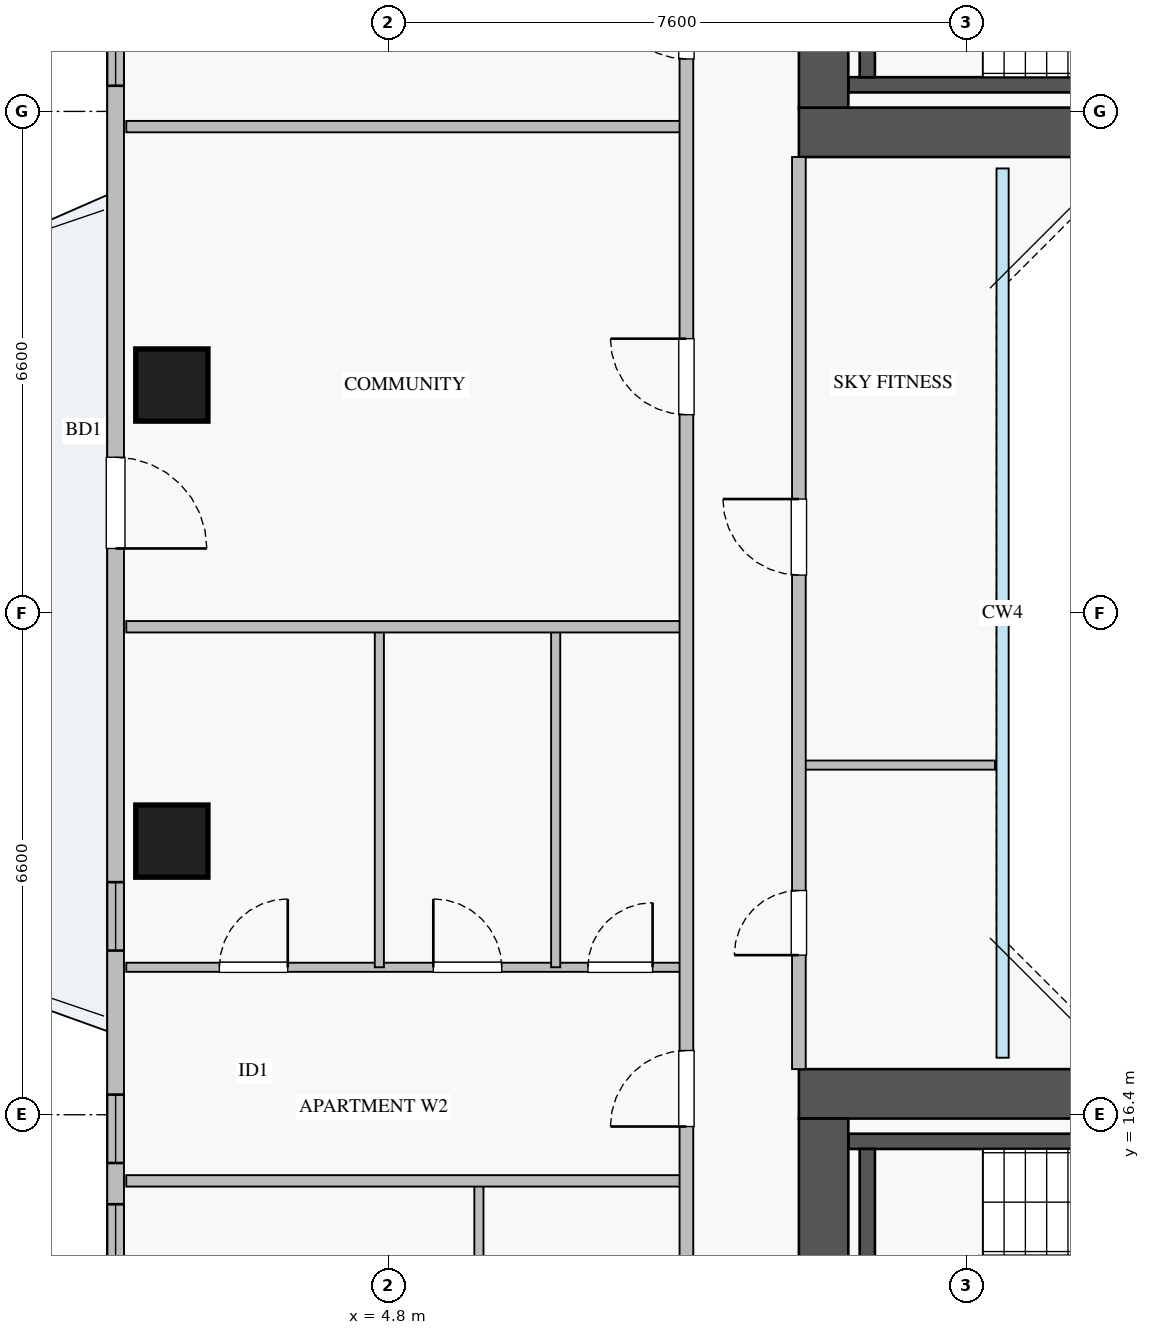
"""IFC4 building model, lengths in metres.
Left out: names, types, materials, properties, quantities, classifications, styles, units other than length and angle.
Written with IfcOpenShell. Run it as: python <this file> out.ifc"""

import sys

from ifc_helpers import new_model, si_unit, direction, frame, frame_2d, origin, origin_2d, place, context, subcontext, project, spatial, rectangle, extrude, source, transform, mapped, element, fill, save


model = new_model("IFC4")
c1 = context("Model", 3, precision=1e-05, world=origin(), true_north=direction((0.0, 1.0)))
c2 = subcontext(c1, "Body", "Model", "MODEL_VIEW")
j1 = project(units=[si_unit("LENGTHUNIT", "METRE"), si_unit("PLANEANGLEUNIT", "RADIAN")], contexts=[c1])
p1 = place(None, origin())
s1 = spatial("IfcSite", under=j1, at=p1, CompositionType="ELEMENT")
p2 = place(p1, origin())
s2 = spatial("IfcBuilding", under=s1, at=p2, CompositionType="ELEMENT")
p3 = place(p2, frame((0.0, 0.0, 182.75)))
s3 = spatial("IfcBuildingStorey", under=s2, at=p3, CompositionType="ELEMENT", Elevation=182.75)
p4 = place(p3, frame((10.85, 29.95, 0.0), z_axis=(0.0, 0.0, 1.0), x_axis=(1.0, 0.0, 0.0)))
e1 = element("IfcWall", 1, at=p4, inside=s3, PredefinedType="SHEAR", context=c2, shape_type="SweptSolid", body=[
    extrude(rectangle(XDim=7.3, YDim=0.2, at=frame_2d((3.65, 0.0))), origin(), (0.0, 0.0, 1.0), 3.25),
])
p5 = place(p3, frame((11.1, 30.05, 0.0), z_axis=(0.0, 0.0, 1.0), x_axis=(0.0, 1.0, 0.0)))
e2 = element("IfcWall", 2, at=p5, inside=s3, PredefinedType="SHEAR", context=c2, shape_type="SweptSolid", body=[
    extrude(rectangle(XDim=2.94, YDim=0.2, at=frame_2d((1.47, 0.0))), origin(), (0.0, 0.0, 1.0), 3.25),
])
p6 = place(p3, frame((10.85, 16.05, 0.0), z_axis=(0.0, 0.0, 1.0), x_axis=(1.0, 0.0, 0.0)))
e3 = element("IfcWall", 3, at=p6, inside=s3, PredefinedType="SHEAR", context=c2, shape_type="SweptSolid", body=[
    extrude(rectangle(XDim=7.3, YDim=0.2, at=frame_2d((3.65, 0.0))), origin(), (0.0, 0.0, 1.0), 3.25),
])
p7 = place(p3, frame((11.1, 13.01, 0.0), z_axis=(0.0, 0.0, 1.0), x_axis=(0.0, 1.0, 0.0)))
e4 = element("IfcWall", 4, at=p7, inside=s3, PredefinedType="SHEAR", context=c2, shape_type="SweptSolid", body=[
    extrude(rectangle(XDim=2.94, YDim=0.2, at=frame_2d((1.47, 0.0))), origin(), (0.0, 0.0, 1.0), 3.25),
])
p8 = place(p3, frame((10.2, 29.325, 0.0), z_axis=(0.0, 0.0, 1.0), x_axis=(1.0, 0.0, 0.0)))
e5 = element("IfcWall", 5, at=p8, inside=s3, PredefinedType="SHEAR", context=c2, shape_type="SweptSolid", body=[
    extrude(rectangle(XDim=17.6, YDim=0.65, at=frame_2d((8.8, 0.0))), origin(), (0.0, 0.0, 1.0), 3.25),
])
p9 = place(p3, frame((10.525, 29.65, 0.0), z_axis=(0.0, 0.0, 1.0), x_axis=(0.0, 1.0, 0.0)))
e6 = element("IfcWall", 6, at=p9, inside=s3, PredefinedType="SHEAR", context=c2, shape_type="SweptSolid", body=[
    extrude(rectangle(XDim=5.9, YDim=0.65, at=frame_2d((2.95, 0.0))), origin(), (0.0, 0.0, 1.0), 3.25),
])
p10 = place(p3, frame((10.2, 16.675, 0.0), z_axis=(0.0, 0.0, 1.0), x_axis=(1.0, 0.0, 0.0)))
e7 = element("IfcWall", 7, at=p10, inside=s3, PredefinedType="SHEAR", context=c2, shape_type="SweptSolid", body=[
    extrude(rectangle(XDim=17.6, YDim=0.65, at=frame_2d((8.8, 0.0))), origin(), (0.0, 0.0, 1.0), 3.25),
])
p11 = place(p3, frame((10.525, 10.45, 0.0), z_axis=(0.0, 0.0, 1.0), x_axis=(0.0, 1.0, 0.0)))
e8 = element("IfcWall", 8, at=p11, inside=s3, PredefinedType="SHEAR", context=c2, shape_type="SweptSolid", body=[
    extrude(rectangle(XDim=5.9, YDim=0.65, at=frame_2d((2.95, 0.0))), origin(), (0.0, 0.0, 1.0), 3.25),
])
m1 = source(origin(), c2, "Body", "SweptSolid", [
    extrude(rectangle(XDim=0.95, YDim=0.95, at=origin_2d()), origin(), (0.0, 0.0, 1.0), 3.25),
])
for number, where, z_axis, x_axis in (
    (9, (1.95, 26.0, 0.0), (0.0, 0.0, 1.0), (1.0, 0.0, 0.0)),
    (10, (1.95, 20.0, 0.0), (0.0, 0.0, 1.0), (1.0, 0.0, 0.0)),
):
    element("IfcColumn", number, at=place(p3, frame(where, z_axis=z_axis, x_axis=x_axis)), inside=s3, PredefinedType="COLUMN", context=c2, shape_type="MappedRepresentation", body=[
        mapped(m1, transform((0.0, 0.0, 0.0), x_axis=(1.0, 0.0, 0.0), y_axis=(0.0, 1.0, 0.0), z_axis=(0.0, 0.0, 1.0), scale=1.0)),
    ])
p12 = place(p3, frame((1.21, 10.55, 0.0), z_axis=(0.0, 0.0, 1.0), x_axis=(0.0, 1.0, 0.0)))
e11 = element("IfcWall", 11, at=p12, inside=s3, PredefinedType="STANDARD", context=c2, shape_type="SweptSolid", body=[
    extrude(rectangle(XDim=24.9, YDim=0.22, at=frame_2d((12.45, 0.0))), origin(), (0.0, 0.0, 1.0), 2.57),
])
p13 = place(p12, frame((13.3, 0.0, 0.0)))
e12 = element("IfcOpeningElement", 12, at=p13, cuts=e11, PredefinedType="OPENING", context=c2, shape_type="SweptSolid", body=[
    extrude(rectangle(XDim=1.2, YDim=2.1, at=frame_2d((0.6, 1.05))), frame((0.0, 0.12, 0.0), z_axis=(0.0, -1.0, 0.0), x_axis=(1.0, 0.0, 0.0)), (0.0, 0.0, 1.0), 0.24),
])
p14 = place(p12, frame((2.573, 0.0, 0.9)))
e13 = element("IfcOpeningElement", 13, at=p14, cuts=e11, PredefinedType="OPENING", context=c2, shape_type="SweptSolid", body=[
    extrude(rectangle(XDim=2.1, YDim=1.5, at=frame_2d((1.05, 0.75))), frame((0.0, 0.12, 0.0), z_axis=(0.0, -1.0, 0.0), x_axis=(1.0, 0.0, 0.0)), (0.0, 0.0, 1.0), 0.24),
])
p15 = place(p12, frame((19.387, 0.0, 0.9)))
e14 = element("IfcOpeningElement", 14, at=p15, cuts=e11, PredefinedType="OPENING", context=c2, shape_type="SweptSolid", body=[
    extrude(rectangle(XDim=2.1, YDim=1.5, at=frame_2d((1.05, 0.75))), frame((0.0, 0.12, 0.0), z_axis=(0.0, -1.0, 0.0), x_axis=(1.0, 0.0, 0.0)), (0.0, 0.0, 1.0), 0.24),
])
p16 = place(p12, frame((22.24, 0.0, 0.9)))
e15 = element("IfcOpeningElement", 15, at=p16, cuts=e11, PredefinedType="OPENING", context=c2, shape_type="SweptSolid", body=[
    extrude(rectangle(XDim=2.4, YDim=1.5, at=frame_2d((1.2, 0.75))), frame((0.0, 0.12, 0.0), z_axis=(0.0, -1.0, 0.0), x_axis=(1.0, 0.0, 0.0)), (0.0, 0.0, 1.0), 0.24),
])
p17 = place(p12, frame((0.25, 0.0, 0.9)))
e16 = element("IfcOpeningElement", 16, at=p17, cuts=e11, PredefinedType="OPENING", context=c2, shape_type="SweptSolid", body=[
    extrude(rectangle(XDim=0.9, YDim=1.2, at=frame_2d((0.45, 0.6))), frame((0.0, 0.12, 0.0), z_axis=(0.0, -1.0, 0.0), x_axis=(1.0, 0.0, 0.0)), (0.0, 0.0, 1.0), 0.24),
])
p18 = place(p12, frame((8.01, 0.0, 0.9)))
e17 = element("IfcOpeningElement", 17, at=p18, cuts=e11, PredefinedType="OPENING", context=c2, shape_type="SweptSolid", body=[
    extrude(rectangle(XDim=0.9, YDim=1.2, at=frame_2d((0.45, 0.6))), frame((0.0, 0.12, 0.0), z_axis=(0.0, -1.0, 0.0), x_axis=(1.0, 0.0, 0.0)), (0.0, 0.0, 1.0), 0.24),
])
p19 = place(p12, frame((5.215, 0.0, 0.9)))
e18 = element("IfcOpeningElement", 18, at=p19, cuts=e11, PredefinedType="OPENING", context=c2, shape_type="SweptSolid", body=[
    extrude(rectangle(XDim=0.9, YDim=1.2, at=frame_2d((0.45, 0.6))), frame((0.0, 0.12, 0.0), z_axis=(0.0, -1.0, 0.0), x_axis=(1.0, 0.0, 0.0)), (0.0, 0.0, 1.0), 0.24),
])
p20 = place(p3, frame((5.99, 12.83, 0.0), z_axis=(0.0, 0.0, 1.0), x_axis=(0.0, 1.0, 0.0)))
e19 = element("IfcWall", 19, at=p20, inside=s3, PredefinedType="PLUMBINGWALL", context=c2, shape_type="SweptSolid", body=[
    extrude(rectangle(XDim=2.7, YDim=0.12, at=frame_2d((1.35, 0.0))), origin(), (0.0, 0.0, 1.0), 2.825),
])
p21 = place(p3, frame((1.35, 18.34, 0.0), z_axis=(0.0, 0.0, 1.0), x_axis=(1.0, 0.0, 0.0)))
e20 = element("IfcWall", 20, at=p21, inside=s3, PredefinedType="PLUMBINGWALL", context=c2, shape_type="SweptSolid", body=[
    extrude(rectangle(XDim=7.37, YDim=0.12, at=frame_2d((3.685, 0.0))), origin(), (0.0, 0.0, 1.0), 2.731),
])
p22 = place(p21, frame((1.225, 0.0, 0.0)))
e21 = element("IfcOpeningElement", 21, at=p22, cuts=e20, PredefinedType="OPENING", context=c2, shape_type="SweptSolid", body=[
    extrude(rectangle(XDim=0.9, YDim=2.05, at=frame_2d((0.45, 1.025))), frame((0.0, 0.07, 0.0), z_axis=(0.0, -1.0, 0.0), x_axis=(1.0, 0.0, 0.0)), (0.0, 0.0, 1.0), 0.14),
])
p23 = place(p21, frame((4.04, 0.0, 0.0)))
e22 = element("IfcOpeningElement", 22, at=p23, cuts=e20, PredefinedType="OPENING", context=c2, shape_type="SweptSolid", body=[
    extrude(rectangle(XDim=0.9, YDim=2.05, at=frame_2d((0.45, 1.025))), frame((0.0, 0.07, 0.0), z_axis=(0.0, -1.0, 0.0), x_axis=(1.0, 0.0, 0.0)), (0.0, 0.0, 1.0), 0.14),
])
p24 = place(p21, frame((6.075, 0.0, 0.0)))
e23 = element("IfcOpeningElement", 23, at=p24, cuts=e20, PredefinedType="OPENING", context=c2, shape_type="SweptSolid", body=[
    extrude(rectangle(XDim=0.85, YDim=2.05, at=frame_2d((0.425, 1.025))), frame((0.0, 0.07, 0.0), z_axis=(0.0, -1.0, 0.0), x_axis=(1.0, 0.0, 0.0)), (0.0, 0.0, 1.0), 0.14),
])
for number, where, z_axis, x_axis in (
    (24, (4.68, 18.34, 0.0), (0.0, 0.0, 1.0), (0.0, 1.0, 0.0)),
    (25, (7.0, 18.34, 0.0), (0.0, 0.0, 1.0), (0.0, 1.0, 0.0)),
):
    element("IfcWall", number, at=place(p3, frame(where, z_axis=z_axis, x_axis=x_axis)), inside=s3, PredefinedType="PLUMBINGWALL", context=c2, shape_type="SweptSolid", body=[
        extrude(rectangle(XDim=4.48, YDim=0.12, at=frame_2d((2.24, 0.0))), origin(), (0.0, 0.0, 1.0), 3.03),
    ])
for number, where, z_axis, x_axis in (
    (26, (1.35, 15.53, 0.0), (0.0, 0.0, 1.0), (1.0, 0.0, 0.0)),
    (27, (1.35, 22.82, 0.0), (0.0, 0.0, 1.0), (1.0, 0.0, 0.0)),
    (28, (1.35, 29.4, 0.0), (0.0, 0.0, 1.0), (1.0, 0.0, 0.0)),
):
    element("IfcWall", number, at=place(p3, frame(where, z_axis=z_axis, x_axis=x_axis)), inside=s3, PredefinedType="PARTITIONING", context=c2, shape_type="SweptSolid", body=[
        extrude(rectangle(XDim=7.37, YDim=0.15, at=frame_2d((3.685, 0.0))), origin(), (0.0, 0.0, 1.0), 3.03),
    ])
p25 = place(p3, frame((8.72, 8.31, 0.0), z_axis=(0.0, 0.0, 1.0), x_axis=(0.0, 1.0, 0.0)))
e29 = element("IfcWall", 29, at=p25, inside=s3, PredefinedType="PARTITIONING", context=c2, shape_type="SweptSolid", body=[
    extrude(rectangle(XDim=29.37, YDim=0.18, at=frame_2d((14.685, 0.0))), origin(), (0.0, 0.0, 1.0), 3.03),
])
p26 = place(p25, frame((28.06, 0.0, 0.0)))
e30 = element("IfcOpeningElement", 30, at=p26, cuts=e29, PredefinedType="OPENING", context=c2, shape_type="SweptSolid", body=[
    extrude(rectangle(XDim=0.9, YDim=2.05, at=frame_2d((0.45, 1.025))), frame((0.0, 0.1, 0.0), z_axis=(0.0, -1.0, 0.0), x_axis=(1.0, 0.0, 0.0)), (0.0, 0.0, 1.0), 0.2),
])
p27 = place(p25, frame((0.24, 0.0, 0.0)))
e31 = element("IfcOpeningElement", 31, at=p27, cuts=e29, PredefinedType="OPENING", context=c2, shape_type="SweptSolid", body=[
    extrude(rectangle(XDim=0.9, YDim=2.05, at=frame_2d((0.45, 1.025))), frame((0.0, 0.1, 0.0), z_axis=(0.0, -1.0, 0.0), x_axis=(1.0, 0.0, 0.0)), (0.0, 0.0, 1.0), 0.2),
])
p28 = place(p25, frame((2.25, 0.0, 0.0)))
e32 = element("IfcOpeningElement", 32, at=p28, cuts=e29, PredefinedType="OPENING", context=c2, shape_type="SweptSolid", body=[
    extrude(rectangle(XDim=1.0, YDim=2.05, at=frame_2d((0.5, 1.025))), frame((0.0, 0.1, 0.0), z_axis=(0.0, -1.0, 0.0), x_axis=(1.0, 0.0, 0.0)), (0.0, 0.0, 1.0), 0.2),
])
p29 = place(p25, frame((7.935, 0.0, 0.0)))
e33 = element("IfcOpeningElement", 33, at=p29, cuts=e29, PredefinedType="OPENING", context=c2, shape_type="SweptSolid", body=[
    extrude(rectangle(XDim=1.0, YDim=2.05, at=frame_2d((0.5, 1.025))), frame((0.0, 0.1, 0.0), z_axis=(0.0, -1.0, 0.0), x_axis=(1.0, 0.0, 0.0)), (0.0, 0.0, 1.0), 0.2),
])
p30 = place(p25, frame((17.3, 0.0, 0.0)))
e34 = element("IfcOpeningElement", 34, at=p30, cuts=e29, PredefinedType="OPENING", context=c2, shape_type="SweptSolid", body=[
    extrude(rectangle(XDim=1.0, YDim=2.05, at=frame_2d((0.5, 1.025))), frame((0.0, 0.1, 0.0), z_axis=(0.0, -1.0, 0.0), x_axis=(1.0, 0.0, 0.0)), (0.0, 0.0, 1.0), 0.2),
])
p31 = place(p25, frame((21.98, 0.0, 0.0)))
e35 = element("IfcOpeningElement", 35, at=p31, cuts=e29, PredefinedType="OPENING", context=c2, shape_type="SweptSolid", body=[
    extrude(rectangle(XDim=1.0, YDim=2.05, at=frame_2d((0.5, 1.025))), frame((0.0, 0.1, 0.0), z_axis=(0.0, -1.0, 0.0), x_axis=(1.0, 0.0, 0.0)), (0.0, 0.0, 1.0), 0.2),
])
p32 = place(p3, frame((10.2, 21.0, 0.0), z_axis=(0.0, 0.0, 1.0), x_axis=(1.0, 0.0, 0.0)))
e36 = element("IfcWall", 36, at=p32, inside=s3, PredefinedType="PLUMBINGWALL", context=c2, shape_type="SweptSolid", body=[
    extrude(rectangle(XDim=2.58, YDim=0.12, at=frame_2d((1.29, 0.0))), origin(), (0.0, 0.0, 1.0), 3.03),
])
p33 = place(p3, frame((10.2, 17.0, 0.0), z_axis=(0.0, 0.0, 1.0), x_axis=(0.0, 1.0, 0.0)))
e37 = element("IfcWall", 37, at=p33, inside=s3, PredefinedType="PARTITIONING", context=c2, shape_type="SweptSolid", body=[
    extrude(rectangle(XDim=12.0, YDim=0.18, at=frame_2d((6.0, 0.0))), origin(), (0.0, 0.0, 1.0), 3.03),
])
p34 = place(p33, frame((1.5, 0.0, 0.0)))
e38 = element("IfcOpeningElement", 38, at=p34, cuts=e37, PredefinedType="OPENING", context=c2, shape_type="SweptSolid", body=[
    extrude(rectangle(XDim=0.85, YDim=2.05, at=frame_2d((0.425, 1.025))), frame((0.0, 0.1, 0.0), z_axis=(0.0, -1.0, 0.0), x_axis=(1.0, 0.0, 0.0)), (0.0, 0.0, 1.0), 0.2),
])
p35 = place(p33, frame((6.5, 0.0, 0.0)))
e39 = element("IfcOpeningElement", 39, at=p35, cuts=e37, PredefinedType="OPENING", context=c2, shape_type="SweptSolid", body=[
    extrude(rectangle(XDim=1.0, YDim=2.05, at=frame_2d((0.5, 1.025))), frame((0.0, 0.1, 0.0), z_axis=(0.0, -1.0, 0.0), x_axis=(1.0, 0.0, 0.0)), (0.0, 0.0, 1.0), 0.2),
])
m2 = source(origin(), c2, "Body", "SweptSolid", [
    extrude(rectangle(XDim=1.2, YDim=2.1, at=frame_2d((0.6, 1.05))), frame((0.0, 0.025, 0.0), z_axis=(0.0, -1.0, 0.0), x_axis=(1.0, 0.0, 0.0)), (0.0, 0.0, 1.0), 0.05),
])
p36 = place(p13, frame((1.2, 0.0, 0.0), z_axis=(0.0, 0.0, 1.0), x_axis=(-1.0, 0.0, 0.0)))
e40 = element("IfcDoor", 40, at=p36, inside=s3, OperationType="SINGLE_SWING_LEFT", PredefinedType="DOOR", context=c2, shape_type="MappedRepresentation", body=[
    mapped(m2, transform((0.0, 0.0, 0.0), x_axis=(1.0, 0.0, 0.0), y_axis=(0.0, 1.0, 0.0), z_axis=(0.0, 0.0, 1.0), scale=1.0)),
])
fill(e12, e40)
m3 = source(origin(), c2, "Body", "SweptSolid", [
    extrude(rectangle(XDim=2.1, YDim=1.5, at=frame_2d((1.05, 0.75))), frame((0.0, 0.03, 0.0), z_axis=(0.0, -1.0, 0.0), x_axis=(1.0, 0.0, 0.0)), (0.0, 0.0, 1.0), 0.06),
])
p37 = place(p14, origin())
e41 = element("IfcWindow", 41, at=p37, inside=s3, PartitioningType="TRIPLE_PANEL_VERTICAL", PredefinedType="WINDOW", context=c2, shape_type="MappedRepresentation", body=[
    mapped(m3, transform((0.0, 0.0, 0.0), x_axis=(1.0, 0.0, 0.0), y_axis=(0.0, 1.0, 0.0), z_axis=(0.0, 0.0, 1.0), scale=1.0)),
])
fill(e13, e41)
p38 = place(p15, origin())
e42 = element("IfcWindow", 42, at=p38, inside=s3, PartitioningType="TRIPLE_PANEL_VERTICAL", PredefinedType="WINDOW", context=c2, shape_type="MappedRepresentation", body=[
    mapped(m3, transform((0.0, 0.0, 0.0), x_axis=(1.0, 0.0, 0.0), y_axis=(0.0, 1.0, 0.0), z_axis=(0.0, 0.0, 1.0), scale=1.0)),
])
fill(e14, e42)
m4 = source(origin(), c2, "Body", "SweptSolid", [
    extrude(rectangle(XDim=0.9, YDim=2.05, at=frame_2d((0.45, 1.025))), frame((0.0, 0.025, 0.0), z_axis=(0.0, -1.0, 0.0), x_axis=(1.0, 0.0, 0.0)), (0.0, 0.0, 1.0), 0.05),
])
p39 = place(p22, origin())
e43 = element("IfcDoor", 43, at=p39, inside=s3, OperationType="SINGLE_SWING_RIGHT", PredefinedType="DOOR", context=c2, shape_type="MappedRepresentation", body=[
    mapped(m4, transform((0.0, 0.0, 0.0), x_axis=(1.0, 0.0, 0.0), y_axis=(0.0, 1.0, 0.0), z_axis=(0.0, 0.0, 1.0), scale=1.0)),
])
fill(e21, e43)
p40 = place(p23, origin())
e44 = element("IfcDoor", 44, at=p40, inside=s3, OperationType="SINGLE_SWING_LEFT", PredefinedType="DOOR", context=c2, shape_type="MappedRepresentation", body=[
    mapped(m4, transform((0.0, 0.0, 0.0), x_axis=(1.0, 0.0, 0.0), y_axis=(0.0, 1.0, 0.0), z_axis=(0.0, 0.0, 1.0), scale=1.0)),
])
fill(e22, e44)
m5 = source(origin(), c2, "Body", "SweptSolid", [
    extrude(rectangle(XDim=0.85, YDim=2.05, at=frame_2d((0.425, 1.025))), frame((0.0, 0.025, 0.0), z_axis=(0.0, -1.0, 0.0), x_axis=(1.0, 0.0, 0.0)), (0.0, 0.0, 1.0), 0.05),
])
p41 = place(p24, origin())
e45 = element("IfcDoor", 45, at=p41, inside=s3, OperationType="SINGLE_SWING_RIGHT", PredefinedType="DOOR", context=c2, shape_type="MappedRepresentation", body=[
    mapped(m5, transform((0.0, 0.0, 0.0), x_axis=(1.0, 0.0, 0.0), y_axis=(0.0, 1.0, 0.0), z_axis=(0.0, 0.0, 1.0), scale=1.0)),
])
fill(e23, e45)
m6 = source(origin(), c2, "Body", "SweptSolid", [
    extrude(rectangle(XDim=1.0, YDim=2.05, at=frame_2d((0.5, 1.025))), frame((0.0, 0.025, 0.0), z_axis=(0.0, -1.0, 0.0), x_axis=(1.0, 0.0, 0.0)), (0.0, 0.0, 1.0), 0.05),
])
p42 = place(p29, origin())
e46 = element("IfcDoor", 46, at=p42, inside=s3, OperationType="SINGLE_SWING_LEFT", PredefinedType="DOOR", context=c2, shape_type="MappedRepresentation", body=[
    mapped(m6, transform((0.0, 0.0, 0.0), x_axis=(1.0, 0.0, 0.0), y_axis=(0.0, 1.0, 0.0), z_axis=(0.0, 0.0, 1.0), scale=1.0)),
])
fill(e33, e46)
p43 = place(p30, origin())
e47 = element("IfcDoor", 47, at=p43, inside=s3, OperationType="SINGLE_SWING_RIGHT", PredefinedType="DOOR", context=c2, shape_type="MappedRepresentation", body=[
    mapped(m6, transform((0.0, 0.0, 0.0), x_axis=(1.0, 0.0, 0.0), y_axis=(0.0, 1.0, 0.0), z_axis=(0.0, 0.0, 1.0), scale=1.0)),
])
fill(e34, e47)
p44 = place(p31, origin())
e48 = element("IfcDoor", 48, at=p44, inside=s3, OperationType="SINGLE_SWING_RIGHT", PredefinedType="DOOR", context=c2, shape_type="MappedRepresentation", body=[
    mapped(m6, transform((0.0, 0.0, 0.0), x_axis=(1.0, 0.0, 0.0), y_axis=(0.0, 1.0, 0.0), z_axis=(0.0, 0.0, 1.0), scale=1.0)),
])
fill(e35, e48)
p45 = place(p34, origin())
e49 = element("IfcDoor", 49, at=p45, inside=s3, OperationType="SINGLE_SWING_LEFT", PredefinedType="DOOR", context=c2, shape_type="MappedRepresentation", body=[
    mapped(m5, transform((0.0, 0.0, 0.0), x_axis=(1.0, 0.0, 0.0), y_axis=(0.0, 1.0, 0.0), z_axis=(0.0, 0.0, 1.0), scale=1.0)),
])
fill(e38, e49)
p46 = place(p35, origin())
e50 = element("IfcDoor", 50, at=p46, inside=s3, OperationType="SINGLE_SWING_RIGHT", PredefinedType="DOOR", context=c2, shape_type="MappedRepresentation", body=[
    mapped(m6, transform((0.0, 0.0, 0.0), x_axis=(1.0, 0.0, 0.0), y_axis=(0.0, 1.0, 0.0), z_axis=(0.0, 0.0, 1.0), scale=1.0)),
])
fill(e39, e50)
m7 = source(origin(), c2, "Body", "SweptSolid", [
    extrude(rectangle(XDim=0.9, YDim=1.2, at=frame_2d((0.45, 0.6))), frame((0.0, 0.03, 0.0), z_axis=(0.0, -1.0, 0.0), x_axis=(1.0, 0.0, 0.0)), (0.0, 0.0, 1.0), 0.06),
])
p47 = place(p18, origin())
e51 = element("IfcWindow", 51, at=p47, inside=s3, PartitioningType="SINGLE_PANEL", PredefinedType="WINDOW", context=c2, shape_type="MappedRepresentation", body=[
    mapped(m7, transform((0.0, 0.0, 0.0), x_axis=(1.0, 0.0, 0.0), y_axis=(0.0, 1.0, 0.0), z_axis=(0.0, 0.0, 1.0), scale=1.0)),
])
fill(e17, e51)
p48 = place(p19, origin())
e52 = element("IfcWindow", 52, at=p48, inside=s3, PartitioningType="SINGLE_PANEL", PredefinedType="WINDOW", context=c2, shape_type="MappedRepresentation", body=[
    mapped(m7, transform((0.0, 0.0, 0.0), x_axis=(1.0, 0.0, 0.0), y_axis=(0.0, 1.0, 0.0), z_axis=(0.0, 0.0, 1.0), scale=1.0)),
])
fill(e18, e52)
save(model, sys.argv[1])
